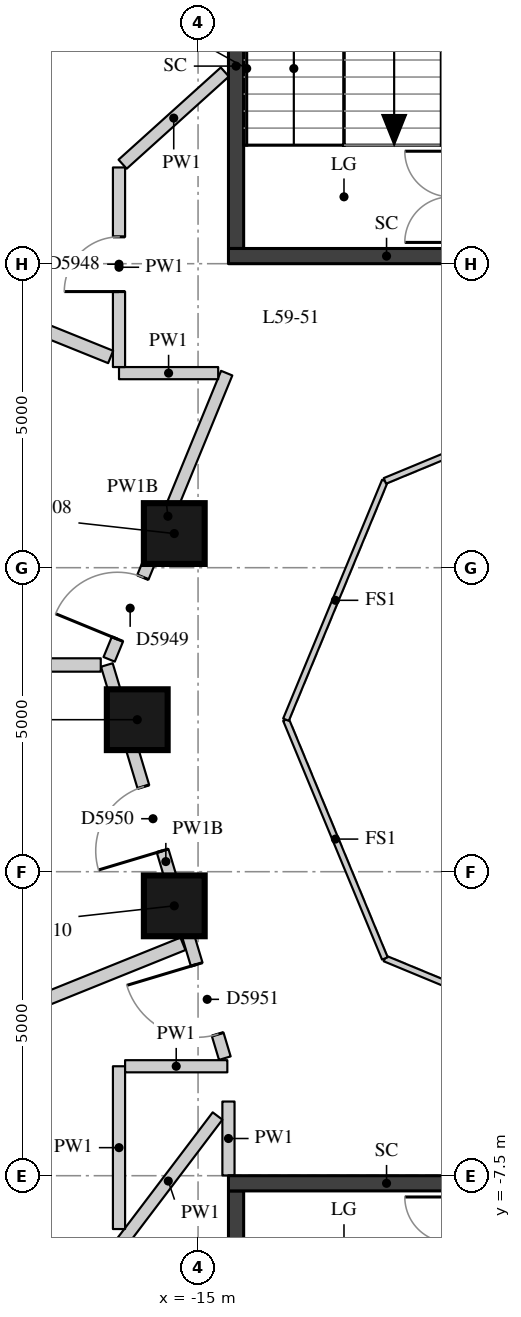
"""IFC4 building model, lengths in metres.
Left out: names, types, materials, properties, quantities, classifications, styles, units other than length and angle.
Written with IfcOpenShell. Run it as: python <this file> out.ifc"""

import sys

from ifc_helpers import new_model, si_unit, direction, frame, frame_2d, origin, origin_2d, place, context, subcontext, project, spatial, rectangle, extrude, element, fill, save


model = new_model("IFC4")
c1 = context("Model", 3, precision=1e-05, world=origin(), true_north=direction((0.0, 1.0)))
c2 = subcontext(c1, "Body", "Model", "MODEL_VIEW")
j1 = project(units=[si_unit("LENGTHUNIT", "METRE"), si_unit("PLANEANGLEUNIT", "RADIAN")], contexts=[c1])
p1 = place(None, origin())
s1 = spatial("IfcSite", under=j1, at=p1, CompositionType="ELEMENT")
p2 = place(p1, origin())
s2 = spatial("IfcBuilding", under=s1, at=p2, CompositionType="ELEMENT")
p3 = place(p2, frame((0.0, 0.0, 209.0)))
s3 = spatial("IfcBuildingStorey", under=s2, at=p3, CompositionType="ELEMENT", Elevation=209.0)
for number, where, z_axis, x_axis in (
    (1, (-15.391, 3.062, 0.0), (0.0, 0.0, 1.0), (1.0, 0.0, 0.0)),
    (2, (-16.0, 0.0, 0.0), (0.0, 0.0, 1.0), (1.0, 0.0, 0.0)),
    (3, (-15.391, -3.062, 0.0), (0.0, 0.0, 1.0), (1.0, 0.0, 0.0)),
):
    element("IfcColumn", number, at=place(p3, frame(where, z_axis=z_axis, x_axis=x_axis)), inside=s3, PredefinedType="COLUMN", context=c2, shape_type="SweptSolid", body=[
        extrude(rectangle(XDim=1.0, YDim=1.0, at=origin_2d()), origin(), (0.0, 0.0, 1.0), 3.3),
    ])
p4 = place(p3, frame((-14.375, 7.75, -0.28), z_axis=(0.0, 0.0, 1.0), x_axis=(0.0, 1.0, 0.0)))
e4 = element("IfcWall", 4, at=p4, inside=s3, PredefinedType="SHEAR", context=c2, shape_type="SweptSolid", body=[
    extrude(rectangle(XDim=6.0, YDim=0.25, at=frame_2d((3.0, 0.0))), origin(), (0.0, 0.0, 1.0), 3.3),
])
p5 = place(p3, frame((-14.5, 7.625, -0.28), z_axis=(0.0, 0.0, 1.0), x_axis=(1.0, 0.0, 0.0)))
e5 = element("IfcWall", 5, at=p5, inside=s3, PredefinedType="SHEAR", context=c2, shape_type="SweptSolid", body=[
    extrude(rectangle(XDim=5.2, YDim=0.25, at=frame_2d((2.6, 0.0))), origin(), (0.0, 0.0, 1.0), 3.3),
])
p6 = place(p3, frame((-14.375, -13.75, -0.28), z_axis=(0.0, 0.0, 1.0), x_axis=(0.0, 1.0, 0.0)))
e6 = element("IfcWall", 6, at=p6, inside=s3, PredefinedType="SHEAR", context=c2, shape_type="SweptSolid", body=[
    extrude(rectangle(XDim=6.0, YDim=0.25, at=frame_2d((3.0, 0.0))), origin(), (0.0, 0.0, 1.0), 3.3),
])
p7 = place(p3, frame((-14.5, -7.625, -0.28), z_axis=(0.0, 0.0, 1.0), x_axis=(1.0, 0.0, 0.0)))
e7 = element("IfcWall", 7, at=p7, inside=s3, PredefinedType="SHEAR", context=c2, shape_type="SweptSolid", body=[
    extrude(rectangle(XDim=5.2, YDim=0.25, at=frame_2d((2.6, 0.0))), origin(), (0.0, 0.0, 1.0), 3.3),
])
p8 = place(p3, frame((-14.5, -7.496, 0.0), z_axis=(0.0, 0.0, 1.0), x_axis=(0.0, 1.0, 0.0)))
e8 = element("IfcWall", 8, at=p8, inside=s3, PredefinedType="PARTITIONING", context=c2, shape_type="SweptSolid", body=[
    extrude(rectangle(XDim=1.216, YDim=0.2, at=frame_2d((0.608, 0.0))), origin(), (0.0, 0.0, 1.0), 3.02),
])
p9 = place(p3, frame((-14.679, -6.518, 0.0), z_axis=(0.0, 0.0, 1.0), x_axis=(-0.603820908912, -0.797120009761, 0.0)))
e9 = element("IfcWall", 9, at=p9, inside=s3, PredefinedType="PARTITIONING", context=c2, shape_type="SweptSolid", body=[
    extrude(rectangle(XDim=2.684, YDim=0.2, at=frame_2d((1.342, 0.0))), origin(), (0.0, 0.0, 1.0), 3.02),
])
p10 = place(p3, frame((-16.3, -8.377, 0.0), z_axis=(0.0, 0.0, 1.0), x_axis=(0.0, 1.0, 0.0)))
e10 = element("IfcWall", 10, at=p10, inside=s3, PredefinedType="PARTITIONING", context=c2, shape_type="SweptSolid", body=[
    extrude(rectangle(XDim=2.677, YDim=0.2, at=frame_2d((1.339, 0.0))), origin(), (0.0, 0.0, 1.0), 3.02),
])
p11 = place(p3, frame((-16.2, -5.7, 0.0), z_axis=(0.0, 0.0, 1.0), x_axis=(1.0, 0.0, 0.0)))
e11 = element("IfcWall", 11, at=p11, inside=s3, PredefinedType="PARTITIONING", context=c2, shape_type="SweptSolid", body=[
    extrude(rectangle(XDim=1.681, YDim=0.2, at=frame_2d((0.841, 0.0))), origin(), (0.0, 0.0, 1.0), 3.02),
])
p12 = place(p3, frame((-14.56, -5.567, 0.0), z_axis=(0.0, 0.0, 1.0), x_axis=(-0.287410918602, 0.95780737305, 0.0)))
e12 = element("IfcWall", 12, at=p12, inside=s3, PredefinedType="PARTITIONING", context=c2, shape_type="SweptSolid", body=[
    extrude(rectangle(XDim=6.751, YDim=0.2, at=frame_2d((3.376, 0.0))), origin(), (0.0, 0.0, 1.0), 2.52),
])
p13 = place(p12, frame((3.561, 0.0, 0.0)))
e13 = element("IfcOpeningElement", 13, at=p13, cuts=e12, PredefinedType="OPENING", context=c2, shape_type="SweptSolid", body=[
    extrude(rectangle(XDim=1.1, YDim=2.1, at=frame_2d((0.55, 1.05))), frame((0.0, 0.11, 0.0), z_axis=(0.0, -1.0, 0.0), x_axis=(1.0, 0.0, 0.0)), (0.0, 0.0, 1.0), 0.22),
])
p14 = place(p12, frame((0.41, 0.0, 0.0)))
e14 = element("IfcOpeningElement", 14, at=p14, cuts=e12, PredefinedType="OPENING", context=c2, shape_type="SweptSolid", body=[
    extrude(rectangle(XDim=1.2, YDim=2.1, at=frame_2d((0.6, 1.05))), frame((0.0, 0.11, 0.0), z_axis=(0.0, -1.0, 0.0), x_axis=(1.0, 0.0, 0.0)), (0.0, 0.0, 1.0), 0.22),
])
p15 = place(p3, frame((-16.462, 0.993, 0.0), z_axis=(0.0, 0.0, 1.0), x_axis=(0.37991958703, 0.925019517303, 0.0)))
e15 = element("IfcWall", 15, at=p15, inside=s3, PredefinedType="PARTITIONING", context=c2, shape_type="SweptSolid", body=[
    extrude(rectangle(XDim=5.089, YDim=0.2, at=frame_2d((2.544, 0.0))), origin(), (0.0, 0.0, 1.0), 2.52),
])
p16 = place(p15, frame((0.36, 0.0, 0.0)))
e16 = element("IfcOpeningElement", 16, at=p16, cuts=e15, PredefinedType="OPENING", context=c2, shape_type="SweptSolid", body=[
    extrude(rectangle(XDim=1.1, YDim=2.1, at=frame_2d((0.55, 1.05))), frame((0.0, 0.11, 0.0), z_axis=(0.0, -1.0, 0.0), x_axis=(1.0, 0.0, 0.0)), (0.0, 0.0, 1.0), 0.22),
])
p17 = place(p3, frame((-14.669, 5.7, 0.0), z_axis=(0.0, 0.0, 1.0), x_axis=(-1.0, 0.0, 0.0)))
e17 = element("IfcWall", 17, at=p17, inside=s3, PredefinedType="PARTITIONING", context=c2, shape_type="SweptSolid", body=[
    extrude(rectangle(XDim=1.631, YDim=0.2, at=frame_2d((0.815, 0.0))), origin(), (0.0, 0.0, 1.0), 3.02),
])
p18 = place(p3, frame((-16.3, 5.8, 0.0), z_axis=(0.0, 0.0, 1.0), x_axis=(0.0, 1.0, 0.0)))
e18 = element("IfcWall", 18, at=p18, inside=s3, PredefinedType="PARTITIONING", context=c2, shape_type="SweptSolid", body=[
    extrude(rectangle(XDim=3.283, YDim=0.2, at=frame_2d((1.641, 0.0))), origin(), (0.0, 0.0, 1.0), 3.02),
])
p19 = place(p18, frame((1.241, 0.0, 0.0)))
e19 = element("IfcOpeningElement", 19, at=p19, cuts=e18, PredefinedType="OPENING", context=c2, shape_type="SweptSolid", body=[
    extrude(rectangle(XDim=0.9, YDim=2.1, at=frame_2d((0.45, 1.05))), frame((0.0, 0.11, 0.0), z_axis=(0.0, -1.0, 0.0), x_axis=(1.0, 0.0, 0.0)), (0.0, 0.0, 1.0), 0.22),
])
p20 = place(p3, frame((-16.24, 9.136, 0.0), z_axis=(0.0, 0.0, 1.0), x_axis=(0.74251608424, 0.66982823518, 0.0)))
e20 = element("IfcWall", 20, at=p20, inside=s3, PredefinedType="PARTITIONING", context=c2, shape_type="SweptSolid", body=[
    extrude(rectangle(XDim=2.264, YDim=0.2, at=frame_2d((1.132, 0.0))), origin(), (0.0, 0.0, 1.0), 3.02),
])
p21 = place(p3, frame((-22.896, 8.571, 0.0), z_axis=(0.0, 0.0, 1.0), x_axis=(0.927387137769, -0.374103056256, 0.0)))
e21 = element("IfcWall", 21, at=p21, inside=s3, PredefinedType="PARTITIONING", context=c2, shape_type="SweptSolid", body=[
    extrude(rectangle(XDim=6.964, YDim=0.22, at=frame_2d((3.482, 0.0))), origin(), (0.0, 0.0, 1.0), 3.02),
])
p22 = place(p3, frame((-24.4, 0.9, 0.0), z_axis=(0.0, 0.0, 1.0), x_axis=(1.0, 0.0, 0.0)))
e22 = element("IfcWall", 22, at=p22, inside=s3, PredefinedType="PARTITIONING", context=c2, shape_type="SweptSolid", body=[
    extrude(rectangle(XDim=7.8, YDim=0.22, at=frame_2d((3.9, 0.0))), origin(), (0.0, 0.0, 1.0), 2.47),
])
p23 = place(p3, frame((-22.896, -6.771, 0.0), z_axis=(0.0, 0.0, 1.0), x_axis=(0.92738233242, 0.374114968313, 0.0)))
e23 = element("IfcWall", 23, at=p23, inside=s3, PredefinedType="PARTITIONING", context=c2, shape_type="SweptSolid", body=[
    extrude(rectangle(XDim=8.246, YDim=0.22, at=frame_2d((4.123, 0.0))), origin(), (0.0, 0.0, 1.0), 3.02),
])
for number, where, z_axis, x_axis in (
    (24, (-8.0, -5.554, 0.0), (0.0, 0.0, 1.0), (-0.924, 0.383, 0.0)),
    (25, (-11.927, -3.927, 0.0), (0.0, 0.0, 1.0), (-0.383, 0.924, 0.0)),
    (26, (-13.554, 0.0, 0.0), (0.0, 0.0, 1.0), (0.383, 0.924, 0.0)),
    (27, (-11.927, 3.927, 0.0), (0.0, 0.0, 1.0), (0.924, 0.383, 0.0)),
):
    element("IfcWall", number, at=place(p3, frame(where, z_axis=z_axis, x_axis=x_axis)), inside=s3, PredefinedType="PARTITIONING", context=c2, shape_type="SweptSolid", body=[
        extrude(rectangle(XDim=4.251, YDim=0.1, at=frame_2d((2.125, 0.0))), origin(), (0.0, 0.0, 1.0), 3.02),
    ])
p24 = place(p19, origin())
e28 = element("IfcDoor", 28, at=p24, inside=s3, OperationType="SINGLE_SWING_LEFT", PredefinedType="DOOR", context=c2, shape_type="SweptSolid", body=[
    extrude(rectangle(XDim=0.9, YDim=2.1, at=frame_2d((0.45, 1.05))), frame((0.0, 0.025, 0.0), z_axis=(0.0, -1.0, 0.0), x_axis=(1.0, 0.0, 0.0)), (0.0, 0.0, 1.0), 0.05),
])
fill(e19, e28)
p25 = place(p16, origin())
e29 = element("IfcDoor", 29, at=p25, inside=s3, OperationType="SINGLE_SWING_LEFT", PredefinedType="DOOR", context=c2, shape_type="SweptSolid", body=[
    extrude(rectangle(XDim=1.1, YDim=2.1, at=frame_2d((0.55, 1.05))), frame((0.0, 0.025, 0.0), z_axis=(0.0, -1.0, 0.0), x_axis=(1.0, 0.0, 0.0)), (0.0, 0.0, 1.0), 0.05),
])
fill(e16, e29)
p26 = place(p13, origin())
e30 = element("IfcDoor", 30, at=p26, inside=s3, OperationType="SINGLE_SWING_LEFT", PredefinedType="DOOR", context=c2, shape_type="SweptSolid", body=[
    extrude(rectangle(XDim=1.1, YDim=2.1, at=frame_2d((0.55, 1.05))), frame((0.0, 0.025, 0.0), z_axis=(0.0, -1.0, 0.0), x_axis=(1.0, 0.0, 0.0)), (0.0, 0.0, 1.0), 0.05),
])
fill(e13, e30)
p27 = place(p14, origin())
e31 = element("IfcDoor", 31, at=p27, inside=s3, OperationType="SINGLE_SWING_RIGHT", PredefinedType="DOOR", context=c2, shape_type="SweptSolid", body=[
    extrude(rectangle(XDim=1.2, YDim=2.1, at=frame_2d((0.6, 1.05))), frame((0.0, 0.025, 0.0), z_axis=(0.0, -1.0, 0.0), x_axis=(1.0, 0.0, 0.0)), (0.0, 0.0, 1.0), 0.05),
])
fill(e14, e31)
save(model, sys.argv[1])
